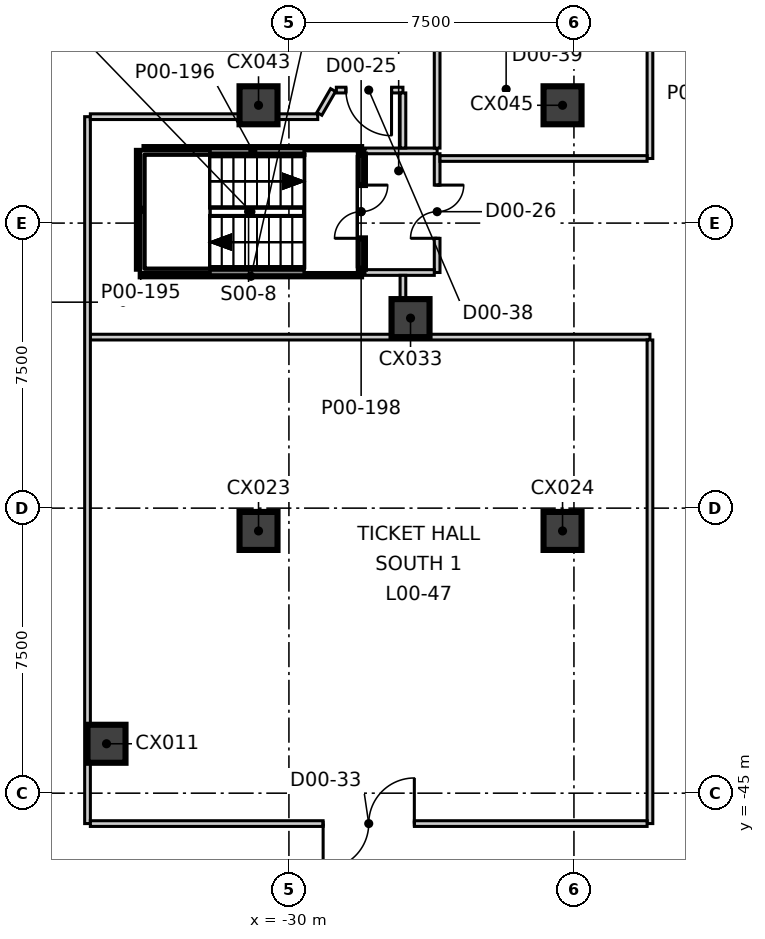
"""IFC4 building model, lengths in metres.
Left out: names, types, materials, properties, quantities, classifications, styles, units other than length and angle.
Written with IfcOpenShell. Run it as: python <this file> out.ifc"""

import sys

from ifc_helpers import new_model, si_unit, direction, frame, frame_2d, origin, origin_2d, place, context, subcontext, project, spatial, rectangle, extrude, element, fill, save


model = new_model("IFC4")
c1 = context("Model", 3, precision=1e-05, world=origin(), true_north=direction((0.0, 1.0)))
c2 = subcontext(c1, "Body", "Model", "MODEL_VIEW")
j1 = project(units=[si_unit("LENGTHUNIT", "METRE"), si_unit("PLANEANGLEUNIT", "RADIAN")], contexts=[c1])
p1 = place(None, origin())
s1 = spatial("IfcSite", under=j1, at=p1, CompositionType="ELEMENT")
p2 = place(p1, origin())
s2 = spatial("IfcBuilding", under=s1, at=p2, CompositionType="ELEMENT")
p3 = place(p2, origin())
s3 = spatial("IfcBuildingStorey", under=s2, at=p3, CompositionType="ELEMENT", Elevation=0.0)
for number, where, z_axis, x_axis in (
    (1, (-34.8, -43.7, -0.4), (0.0, 0.0, 1.0), (1.0, 0.0, 0.0)),
    (2, (-30.8, -38.1, -0.4), (0.0, 0.0, 1.0), (1.0, 0.0, 0.0)),
    (3, (-22.8, -38.1, -0.4), (0.0, 0.0, 1.0), (1.0, 0.0, 0.0)),
    (4, (-26.8, -32.5, -0.4), (0.0, 0.0, 1.0), (1.0, 0.0, 0.0)),
    (5, (-30.8, -26.9, -0.4), (0.0, 0.0, 1.0), (1.0, 0.0, 0.0)),
    (6, (-22.8, -26.9, -0.4), (0.0, 0.0, 1.0), (1.0, 0.0, 0.0)),
):
    element("IfcColumn", number, at=place(p3, frame(where, z_axis=z_axis, x_axis=x_axis)), inside=s3, PredefinedType="COLUMN", context=c2, shape_type="SweptSolid", body=[
        extrude(rectangle(XDim=1.0, YDim=1.0, at=origin_2d()), origin(), (0.0, 0.0, 1.0), 8.5),
    ])
p4 = place(p3, frame((-28.0, -28.1, 0.0), z_axis=(0.0, 0.0, 1.0), x_axis=(1.0, 0.0, 0.0)))
e7 = element("IfcWall", 7, at=p4, inside=s3, PredefinedType="PARTITIONING", context=c2, shape_type="SweptSolid", body=[
    extrude(rectangle(XDim=1.9, YDim=0.15, at=frame_2d((0.95, 0.0))), origin(), (0.0, 0.0, 1.0), 8.1),
])
p5 = place(p3, frame((-26.1, -31.3, 0.0), z_axis=(0.0, 0.0, 1.0), x_axis=(0.0, 1.0, 0.0)))
e8 = element("IfcWall", 8, at=p5, inside=s3, PredefinedType="PARTITIONING", context=c2, shape_type="SweptSolid", body=[
    extrude(rectangle(XDim=3.125, YDim=0.15, at=frame_2d((1.562, 0.0))), origin(), (0.0, 0.0, 1.0), 8.1),
])
p6 = place(p5, frame((0.9, 0.0, 0.0)))
e9 = element("IfcOpeningElement", 9, at=p6, cuts=e8, PredefinedType="OPENING", context=c2, shape_type="SweptSolid", body=[
    extrude(rectangle(XDim=1.4, YDim=2.1, at=frame_2d((0.7, 1.05))), frame((0.0, 0.085, 0.0), z_axis=(0.0, -1.0, 0.0), x_axis=(1.0, 0.0, 0.0)), (0.0, 0.0, 1.0), 0.17),
])
p7 = place(p3, frame((-28.0, -31.3, 0.0), z_axis=(0.0, 0.0, 1.0), x_axis=(1.0, 0.0, 0.0)))
e10 = element("IfcWall", 10, at=p7, inside=s3, PredefinedType="PARTITIONING", context=c2, shape_type="SweptSolid", body=[
    extrude(rectangle(XDim=1.825, YDim=0.15, at=frame_2d((0.913, 0.0))), origin(), (0.0, 0.0, 1.0), 8.1),
])
p8 = place(p3, frame((-35.225, -33.0, 0.0), z_axis=(0.0, 0.0, 1.0), x_axis=(1.0, 0.0, 0.0)))
e11 = element("IfcWall", 11, at=p8, inside=s3, PredefinedType="PARTITIONING", context=c2, shape_type="SweptSolid", body=[
    extrude(rectangle(XDim=14.725, YDim=0.15, at=frame_2d((7.363, 0.0))), origin(), (0.0, 0.0, 1.0), 8.1),
])
p9 = place(p3, frame((-35.3, -45.8, 0.0), z_axis=(0.0, 0.0, 1.0), x_axis=(0.0, 1.0, 0.0)))
e12 = element("IfcWall", 12, at=p9, inside=s3, PredefinedType="PARTITIONING", context=c2, shape_type="SweptSolid", body=[
    extrude(rectangle(XDim=18.6, YDim=0.15, at=frame_2d((9.3, 0.0))), origin(), (0.0, 0.0, 1.0), 8.1),
])
p10 = place(p3, frame((-35.225, -27.2, 0.0), z_axis=(0.0, 0.0, 1.0), x_axis=(1.0, 0.0, 0.0)))
e13 = element("IfcWall", 13, at=p10, inside=s3, PredefinedType="PARTITIONING", context=c2, shape_type="SweptSolid", body=[
    extrude(rectangle(XDim=5.983, YDim=0.15, at=frame_2d((2.992, 0.0))), origin(), (0.0, 0.0, 1.0), 6.6),
])
p11 = place(p3, frame((-29.199, -27.125, 0.0), z_axis=(0.0, 0.0, 1.0), x_axis=(0.500249421803, 0.865881352141, 0.0)))
e14 = element("IfcWall", 14, at=p11, inside=s3, PredefinedType="PARTITIONING", context=c2, shape_type="SweptSolid", body=[
    extrude(rectangle(XDim=0.722, YDim=0.15, at=frame_2d((0.361, 0.0))), origin(), (0.0, 0.0, 1.0), 8.1),
])
p12 = place(p3, frame((-28.752, -26.5, 0.0), z_axis=(0.0, 0.0, 1.0), x_axis=(1.0, 0.0, 0.0)))
e15 = element("IfcWall", 15, at=p12, inside=s3, PredefinedType="PARTITIONING", context=c2, shape_type="SweptSolid", body=[
    extrude(rectangle(XDim=1.752, YDim=0.15, at=frame_2d((0.876, 0.0))), origin(), (0.0, 0.0, 1.0), 8.1),
])
p13 = place(p12, frame((0.252, 0.0, 0.0)))
e16 = element("IfcOpeningElement", 16, at=p13, cuts=e15, PredefinedType="OPENING", context=c2, shape_type="SweptSolid", body=[
    extrude(rectangle(XDim=1.2, YDim=2.1, at=frame_2d((0.6, 1.05))), frame((0.0, 0.085, 0.0), z_axis=(0.0, -1.0, 0.0), x_axis=(1.0, 0.0, 0.0)), (0.0, 0.0, 1.0), 0.17),
])
p14 = place(p3, frame((-27.0, -32.925, 0.0), z_axis=(0.0, 0.0, 1.0), x_axis=(0.0, 1.0, 0.0)))
e17 = element("IfcWall", 17, at=p14, inside=s3, PredefinedType="PARTITIONING", context=c2, shape_type="SweptSolid", body=[
    extrude(rectangle(XDim=1.55, YDim=0.15, at=frame_2d((0.775, 0.0))), origin(), (0.0, 0.0, 1.0), 8.1),
])
p15 = place(p3, frame((-27.0, -28.025, 0.0), z_axis=(0.0, 0.0, 1.0), x_axis=(0.0, 1.0, 0.0)))
e18 = element("IfcWall", 18, at=p15, inside=s3, PredefinedType="PARTITIONING", context=c2, shape_type="SweptSolid", body=[
    extrude(rectangle(XDim=1.45, YDim=0.15, at=frame_2d((0.725, 0.0))), origin(), (0.0, 0.0, 1.0), 8.1),
])
p16 = place(p3, frame((-20.5, -45.8, 0.0), z_axis=(0.0, 0.0, 1.0), x_axis=(0.0, 1.0, 0.0)))
e19 = element("IfcWall", 19, at=p16, inside=s3, PredefinedType="PARTITIONING", context=c2, shape_type="SweptSolid", body=[
    extrude(rectangle(XDim=12.725, YDim=0.15, at=frame_2d((6.363, 0.0))), origin(), (0.0, 0.0, 1.0), 8.1),
])
p17 = place(p3, frame((-20.5, -28.3, 0.0), z_axis=(0.0, 0.0, 1.0), x_axis=(0.0, 1.0, 0.0)))
e20 = element("IfcWall", 20, at=p17, inside=s3, PredefinedType="PARTITIONING", context=c2, shape_type="SweptSolid", body=[
    extrude(rectangle(XDim=3.227, YDim=0.15, at=frame_2d((1.614, 0.0))), origin(), (0.0, 0.0, 1.0), 8.1),
])
p18 = place(p3, frame((-35.225, -45.8, 0.0), z_axis=(0.0, 0.0, 1.0), x_axis=(1.0, 0.0, 0.0)))
e21 = element("IfcWall", 21, at=p18, inside=s3, PredefinedType="PARTITIONING", context=c2, shape_type="SweptSolid", body=[
    extrude(rectangle(XDim=14.65, YDim=0.15, at=frame_2d((7.325, 0.0))), origin(), (0.0, 0.0, 1.0), 8.1),
])
p19 = place(p18, frame((6.125, 0.0, 0.0)))
e22 = element("IfcOpeningElement", 22, at=p19, cuts=e21, PredefinedType="OPENING", context=c2, shape_type="SweptSolid", body=[
    extrude(rectangle(XDim=2.4, YDim=2.1, at=frame_2d((1.2, 1.05))), frame((0.0, 0.085, 0.0), z_axis=(0.0, -1.0, 0.0), x_axis=(1.0, 0.0, 0.0)), (0.0, 0.0, 1.0), 0.17),
])
p20 = place(p3, frame((-26.025, -28.3, 0.0), z_axis=(0.0, 0.0, 1.0), x_axis=(1.0, 0.0, 0.0)))
e23 = element("IfcWall", 23, at=p20, inside=s3, PredefinedType="PARTITIONING", context=c2, shape_type="SweptSolid", body=[
    extrude(rectangle(XDim=5.45, YDim=0.15, at=frame_2d((2.725, 0.0))), origin(), (0.0, 0.0, 1.0), 8.1),
])
p21 = place(p3, frame((-26.1, -28.027, 0.0), z_axis=(0.0, 0.0, 1.0), x_axis=(0.0, 1.0, 0.0)))
e24 = element("IfcWall", 24, at=p21, inside=s3, PredefinedType="PARTITIONING", context=c2, shape_type="SweptSolid", body=[
    extrude(rectangle(XDim=4.027, YDim=0.15, at=frame_2d((2.014, 0.0))), origin(), (0.0, 0.0, 1.0), 8.1),
])
p22 = place(p3, frame((-33.9, -31.3, 0.0), z_axis=(0.0, 0.0, 1.0), x_axis=(1.0, 0.0, 0.0)))
e25 = element("IfcWall", 25, at=p22, inside=s3, PredefinedType="SOLIDWALL", context=c2, shape_type="SweptSolid", body=[
    extrude(rectangle(XDim=5.798, YDim=0.2, at=frame_2d((2.899, 0.0))), origin(), (0.0, 0.0, 1.0), 8.1),
])
p23 = place(p3, frame((-33.9, -31.2, 0.0), z_axis=(0.0, 0.0, 1.0), x_axis=(0.0, 1.0, 0.0)))
e26 = element("IfcWall", 26, at=p23, inside=s3, PredefinedType="SOLIDWALL", context=c2, shape_type="SweptSolid", body=[
    extrude(rectangle(XDim=3.1, YDim=0.2, at=frame_2d((1.55, 0.0))), origin(), (0.0, 0.0, 1.0), 8.1),
])
p24 = place(p3, frame((-33.8, -28.1, 0.0), z_axis=(0.0, 0.0, 1.0), x_axis=(1.0, 0.0, 0.0)))
e27 = element("IfcWall", 27, at=p24, inside=s3, PredefinedType="SOLIDWALL", context=c2, shape_type="SweptSolid", body=[
    extrude(rectangle(XDim=5.7, YDim=0.2, at=frame_2d((2.85, 0.0))), origin(), (0.0, 0.0, 1.0), 8.1),
])
p25 = place(p3, frame((-28.1, -31.2, 0.0), z_axis=(0.0, 0.0, 1.0), x_axis=(0.0, 1.0, 0.0)))
e28 = element("IfcWall", 28, at=p25, inside=s3, PredefinedType="SOLIDWALL", context=c2, shape_type="SweptSolid", body=[
    extrude(rectangle(XDim=3.0, YDim=0.2, at=frame_2d((1.5, 0.0))), origin(), (0.0, 0.0, 1.0), 8.1),
])
p26 = place(p25, frame((0.8, 0.0, 0.0)))
e29 = element("IfcOpeningElement", 29, at=p26, cuts=e28, PredefinedType="OPENING", context=c2, shape_type="SweptSolid", body=[
    extrude(rectangle(XDim=1.4, YDim=2.1, at=frame_2d((0.7, 1.05))), frame((0.0, 0.11, 0.0), z_axis=(0.0, -1.0, 0.0), x_axis=(1.0, 0.0, 0.0)), (0.0, 0.0, 1.0), 0.22),
])
p27 = place(p26, origin())
e30 = element("IfcDoor", 30, at=p27, inside=s3, OperationType="DOUBLE_DOOR_SINGLE_SWING", PredefinedType="DOOR", context=c2, shape_type="SweptSolid", body=[
    extrude(rectangle(XDim=1.4, YDim=2.1, at=frame_2d((0.7, 1.05))), frame((0.0, 0.025, 0.0), z_axis=(0.0, -1.0, 0.0), x_axis=(1.0, 0.0, 0.0)), (0.0, 0.0, 1.0), 0.05),
])
fill(e29, e30)
p28 = place(p6, origin())
e31 = element("IfcDoor", 31, at=p28, inside=s3, OperationType="DOUBLE_DOOR_SINGLE_SWING", PredefinedType="DOOR", context=c2, shape_type="SweptSolid", body=[
    extrude(rectangle(XDim=1.4, YDim=2.1, at=frame_2d((0.7, 1.05))), frame((0.0, 0.025, 0.0), z_axis=(0.0, -1.0, 0.0), x_axis=(1.0, 0.0, 0.0)), (0.0, 0.0, 1.0), 0.05),
])
fill(e9, e31)
p29 = place(p19, origin())
e32 = element("IfcDoor", 32, at=p29, inside=s3, OperationType="DOUBLE_DOOR_SINGLE_SWING", PredefinedType="DOOR", context=c2, shape_type="SweptSolid", body=[
    extrude(rectangle(XDim=2.4, YDim=2.1, at=frame_2d((1.2, 1.05))), frame((0.0, 0.025, 0.0), z_axis=(0.0, -1.0, 0.0), x_axis=(1.0, 0.0, 0.0)), (0.0, 0.0, 1.0), 0.05),
])
fill(e22, e32)
p30 = place(p13, origin())
e33 = element("IfcDoor", 33, at=p30, inside=s3, OperationType="SINGLE_SWING_RIGHT", PredefinedType="DOOR", context=c2, shape_type="SweptSolid", body=[
    extrude(rectangle(XDim=1.2, YDim=2.1, at=frame_2d((0.6, 1.05))), frame((0.0, 0.025, 0.0), z_axis=(0.0, -1.0, 0.0), x_axis=(1.0, 0.0, 0.0)), (0.0, 0.0, 1.0), 0.05),
])
fill(e16, e33)
save(model, sys.argv[1])
